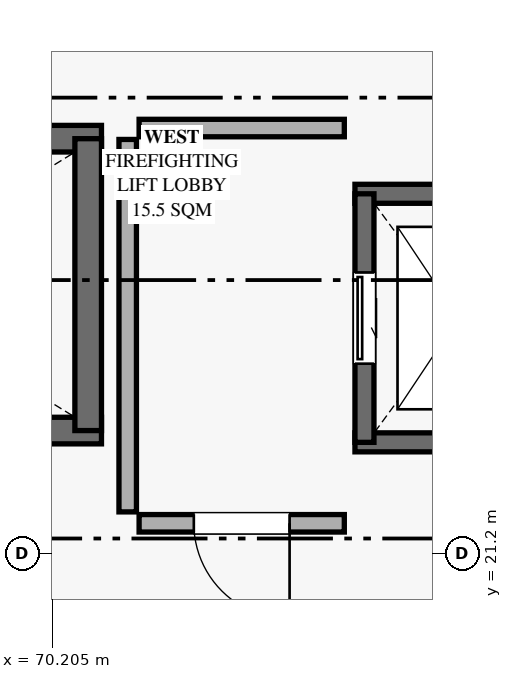
"""IFC4 building model, lengths in metres.
Left out: names, types, materials, properties, quantities, classifications, styles, units other than length and angle.
Written with IfcOpenShell. Run it as: python <this file> out.ifc"""

import sys

from ifc_helpers import new_model, si_unit, direction, frame, frame_2d, origin, place, context, subcontext, project, spatial, rectangle, extrude, element, fill, save


model = new_model("IFC4")
c1 = context("Model", 3, precision=1e-05, world=origin(), true_north=direction((0.0, 1.0)))
c2 = subcontext(c1, "Body", "Model", "MODEL_VIEW")
j1 = project(units=[si_unit("LENGTHUNIT", "METRE"), si_unit("PLANEANGLEUNIT", "RADIAN")], contexts=[c1])
p1 = place(None, origin())
s1 = spatial("IfcSite", under=j1, at=p1, CompositionType="ELEMENT")
p2 = place(p1, origin())
s2 = spatial("IfcBuilding", under=s1, at=p2, CompositionType="ELEMENT")
p3 = place(p2, frame((0.0, 0.0, 15.12)))
s3 = spatial("IfcBuildingStorey", under=s2, at=p3, CompositionType="ELEMENT", Elevation=15.12)
for number, where, z_axis, x_axis in (
    (1, (70.855, 22.82, 0.0), (0.0, 0.0, 1.0), (-1.0, 0.0, 0.0)),
    (2, (62.845, 26.66, 0.0), (0.0, 0.0, 1.0), (1.0, 0.0, 0.0)),
):
    element("IfcWall", number, at=place(p3, frame(where, z_axis=z_axis, x_axis=x_axis)), inside=s3, PredefinedType="SHEAR", context=c2, shape_type="SweptSolid", body=[
        extrude(rectangle(XDim=8.01, YDim=0.35, at=frame_2d((4.005, 0.0))), origin(), (0.0, 0.0, 1.0), 4.41),
    ])
p4 = place(p3, frame((70.68, 26.66, 0.0), z_axis=(0.0, 0.0, 1.0), x_axis=(0.0, -1.0, 0.0)))
e3 = element("IfcWall", 3, at=p4, inside=s3, PredefinedType="SHEAR", context=c2, shape_type="SweptSolid", body=[
    extrude(rectangle(XDim=3.84, YDim=0.35, at=frame_2d((1.92, 0.0))), origin(), (0.0, 0.0, 1.0), 4.41),
])
for number, where, z_axis, x_axis in (
    (4, (76.91, 22.665, 0.0), (0.0, 0.0, 1.0), (-1.0, 0.0, 0.0)),
    (5, (74.19, 25.935, 0.0), (0.0, 0.0, 1.0), (1.0, 0.0, 0.0)),
):
    element("IfcWall", number, at=place(p3, frame(where, z_axis=z_axis, x_axis=x_axis)), inside=s3, PredefinedType="SHEAR", context=c2, shape_type="SweptSolid", body=[
        extrude(rectangle(XDim=2.72, YDim=0.25, at=frame_2d((1.36, 0.0))), origin(), (0.0, 0.0, 1.0), 4.41),
    ])
p5 = place(p3, frame((74.315, 22.665, 0.0), z_axis=(0.0, 0.0, 1.0), x_axis=(0.0, 1.0, 0.0)))
e6 = element("IfcWall", 6, at=p5, inside=s3, PredefinedType="SHEAR", context=c2, shape_type="SweptSolid", body=[
    extrude(rectangle(XDim=3.27, YDim=0.25, at=frame_2d((1.635, 0.0))), origin(), (0.0, 0.0, 1.0), 4.41),
])
p6 = place(p5, frame((1.035, 0.0, 0.0)))
e7 = element("IfcOpeningElement", 7, at=p6, cuts=e6, PredefinedType="OPENING", context=c2, shape_type="SweptSolid", body=[
    extrude(rectangle(XDim=1.2, YDim=2.25, at=frame_2d((0.6, 1.125))), frame((0.0, 0.135, 0.0), z_axis=(0.0, -1.0, 0.0), x_axis=(1.0, 0.0, 0.0)), (0.0, 0.0, 1.0), 0.27),
])
p7 = place(p3, frame((74.05, 21.6, 0.0), z_axis=(0.0, 0.0, 1.0), x_axis=(-1.0, 0.0, 0.0)))
e8 = element("IfcWall", 8, at=p7, inside=s3, PredefinedType="PARTITIONING", context=c2, shape_type="SweptSolid", body=[
    extrude(rectangle(XDim=2.7, YDim=0.23, at=frame_2d((1.35, 0.0))), origin(), (0.0, 0.0, 1.0), 3.16),
])
p8 = place(p7, frame((0.72, 0.0, 0.0)))
e9 = element("IfcOpeningElement", 9, at=p8, cuts=e8, PredefinedType="OPENING", context=c2, shape_type="SweptSolid", body=[
    extrude(rectangle(XDim=1.26, YDim=2.06, at=frame_2d((0.63, 1.03))), frame((0.0, 0.125, 0.0), z_axis=(0.0, -1.0, 0.0), x_axis=(1.0, 0.0, 0.0)), (0.0, 0.0, 1.0), 0.25),
])
p9 = place(p3, frame((71.35, 26.8, 0.0), z_axis=(0.0, 0.0, 1.0), x_axis=(1.0, 0.0, 0.0)))
e10 = element("IfcWall", 10, at=p9, inside=s3, PredefinedType="PARTITIONING", context=c2, shape_type="SweptSolid", body=[
    extrude(rectangle(XDim=2.7, YDim=0.23, at=frame_2d((1.35, 0.0))), origin(), (0.0, 0.0, 1.0), 3.16),
])
p10 = place(p3, frame((71.2, 21.75, 0.0), z_axis=(0.0, 0.0, 1.0), x_axis=(0.0, 1.0, 0.0)))
e11 = element("IfcWall", 11, at=p10, inside=s3, PredefinedType="PARTITIONING", context=c2, shape_type="SweptSolid", body=[
    extrude(rectangle(XDim=4.9, YDim=0.23, at=frame_2d((2.45, 0.0))), origin(), (0.0, 0.0, 1.0), 3.16),
])
p11 = place(p6, origin())
e12 = element("IfcDoor", 12, at=p11, inside=s3, OperationType="SLIDING_TO_LEFT", PredefinedType="DOOR", context=c2, shape_type="SweptSolid", body=[
    extrude(rectangle(XDim=1.2, YDim=2.25, at=frame_2d((0.6, 1.125))), frame((0.0, 0.025, 0.0), z_axis=(0.0, -1.0, 0.0), x_axis=(1.0, 0.0, 0.0)), (0.0, 0.0, 1.0), 0.05),
])
fill(e7, e12)
p12 = place(p8, origin())
e13 = element("IfcDoor", 13, at=p12, inside=s3, OperationType="SINGLE_SWING_LEFT", PredefinedType="DOOR", context=c2, shape_type="SweptSolid", body=[
    extrude(rectangle(XDim=1.26, YDim=2.06, at=frame_2d((0.63, 1.03))), frame((0.0, 0.025, 0.0), z_axis=(0.0, -1.0, 0.0), x_axis=(1.0, 0.0, 0.0)), (0.0, 0.0, 1.0), 0.05),
])
fill(e9, e13)
save(model, sys.argv[1])
